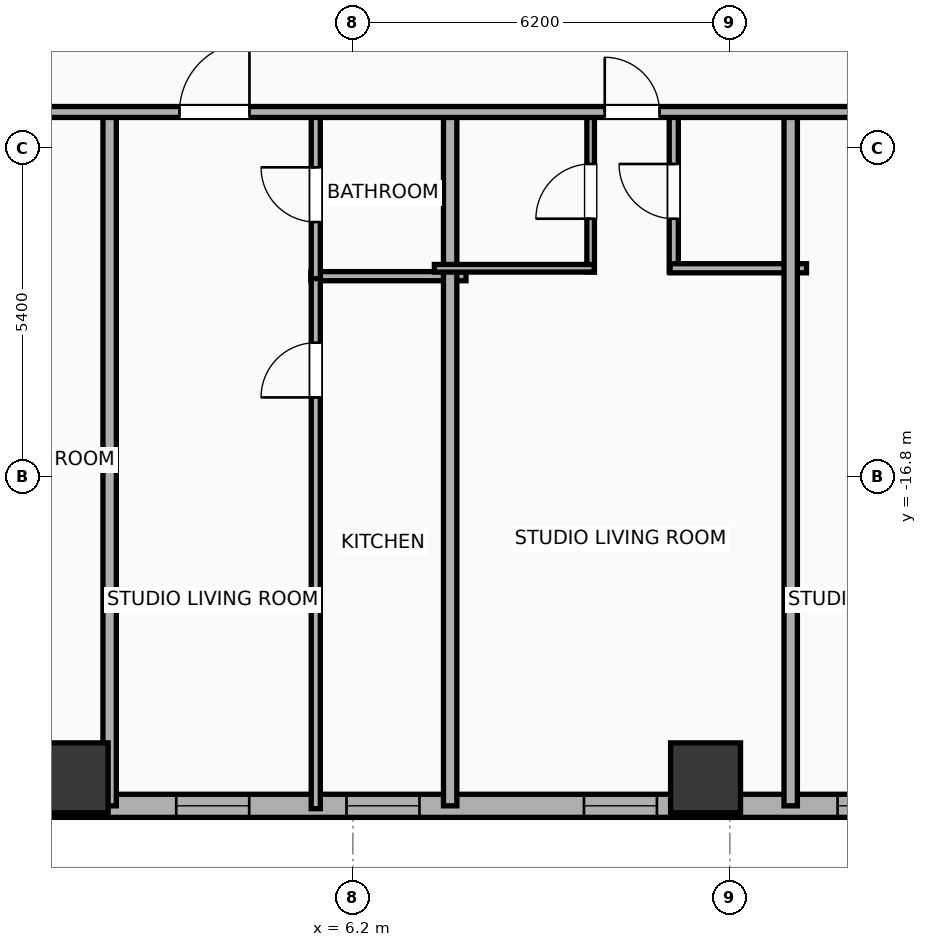
"""IFC4 building model, lengths in metres.
Left out: names, types, materials, properties, quantities, classifications, styles, units other than length and angle.
Written with IfcOpenShell. Run it as: python <this file> out.ifc"""

import sys

from ifc_helpers import new_model, si_unit, direction, frame, frame_2d, origin, origin_2d, place, context, subcontext, project, spatial, rectangle, hollow_rectangle, extrude, element, fill, save


model = new_model("IFC4")
c1 = context("Model", 3, precision=1e-05, world=origin(), true_north=direction((0.0, 1.0)))
c2 = subcontext(c1, "Body", "Model", "MODEL_VIEW")
j1 = project(units=[si_unit("LENGTHUNIT", "METRE"), si_unit("PLANEANGLEUNIT", "RADIAN")], contexts=[c1])
p1 = place(None, origin())
s1 = spatial("IfcSite", under=j1, at=p1, CompositionType="ELEMENT")
p2 = place(p1, origin())
s2 = spatial("IfcBuilding", under=s1, at=p2, CompositionType="ELEMENT")
p3 = place(p2, frame((0.0, 0.0, 29.9)))
s3 = spatial("IfcBuildingStorey", under=s2, at=p3, CompositionType="ELEMENT", Elevation=29.9)
for number, where, z_axis, x_axis in (
    (1, (1.6, -21.75, 0.0), (0.0, 0.0, 1.0), (1.0, 0.0, 0.0)),
    (2, (12.0, -21.75, 0.0), (0.0, 0.0, 1.0), (1.0, 0.0, 0.0)),
):
    element("IfcColumn", number, at=place(p3, frame(where, z_axis=z_axis, x_axis=x_axis)), inside=s3, PredefinedType="COLUMN", context=c2, shape_type="SweptSolid", body=[
        extrude(hollow_rectangle(XDim=1.15, YDim=1.15, WallThickness=0.04, at=origin_2d()), origin(), (0.0, 0.0, 1.0), 3.9),
    ])
p4 = place(p3, frame((22.381, -22.21, 0.0), z_axis=(0.0, 0.0, 1.0), x_axis=(-1.0, 0.0, 0.0)))
e3 = element("IfcWall", 3, at=p4, inside=s3, PredefinedType="ELEMENTEDWALL", context=c2, shape_type="SweptSolid", body=[
    extrude(rectangle(XDim=51.963, YDim=0.38, at=frame_2d((25.981, 0.0))), origin(), (0.0, 0.0, 1.0), 2.54),
])
p5 = place(p4, frame((5.81, 0.0, 0.75)))
e4 = element("IfcOpeningElement", 4, at=p5, cuts=e3, PredefinedType="OPENING", context=c2, shape_type="SweptSolid", body=[
    extrude(rectangle(XDim=2.4, YDim=1.63, at=frame_2d((1.2, 0.815))), frame((0.0, 0.2, 0.0), z_axis=(0.0, -1.0, 0.0), x_axis=(1.0, 0.0, 0.0)), (0.0, 0.0, 1.0), 0.4),
])
p6 = place(p4, frame((26.431, 0.0, 0.75)))
e5 = element("IfcOpeningElement", 5, at=p6, cuts=e3, PredefinedType="OPENING", context=c2, shape_type="SweptSolid", body=[
    extrude(rectangle(XDim=2.4, YDim=1.63, at=frame_2d((1.2, 0.815))), frame((0.0, 0.2, 0.0), z_axis=(0.0, -1.0, 0.0), x_axis=(1.0, 0.0, 0.0)), (0.0, 0.0, 1.0), 0.4),
])
p7 = place(p4, frame((42.952, 0.0, 0.75)))
e6 = element("IfcOpeningElement", 6, at=p7, cuts=e3, PredefinedType="OPENING", context=c2, shape_type="SweptSolid", body=[
    extrude(rectangle(XDim=2.4, YDim=1.63, at=frame_2d((1.2, 0.815))), frame((0.0, 0.2, 0.0), z_axis=(0.0, -1.0, 0.0), x_axis=(1.0, 0.0, 0.0)), (0.0, 0.0, 1.0), 0.4),
])
p8 = place(p4, frame((49.027, 0.0, 0.75)))
e7 = element("IfcOpeningElement", 7, at=p8, cuts=e3, PredefinedType="OPENING", context=c2, shape_type="SweptSolid", body=[
    extrude(rectangle(XDim=1.2, YDim=1.63, at=frame_2d((0.6, 0.815))), frame((0.0, 0.2, 0.0), z_axis=(0.0, -1.0, 0.0), x_axis=(1.0, 0.0, 0.0)), (0.0, 0.0, 1.0), 0.4),
])
p9 = place(p4, frame((46.476, 0.0, 0.75)))
e8 = element("IfcOpeningElement", 8, at=p9, cuts=e3, PredefinedType="OPENING", context=c2, shape_type="SweptSolid", body=[
    extrude(rectangle(XDim=1.2, YDim=1.63, at=frame_2d((0.6, 0.815))), frame((0.0, 0.2, 0.0), z_axis=(0.0, -1.0, 0.0), x_axis=(1.0, 0.0, 0.0)), (0.0, 0.0, 1.0), 0.4),
])
p10 = place(p4, frame((39.181, 0.0, 0.75)))
e9 = element("IfcOpeningElement", 9, at=p10, cuts=e3, PredefinedType="OPENING", context=c2, shape_type="SweptSolid", body=[
    extrude(rectangle(XDim=1.2, YDim=1.63, at=frame_2d((0.6, 0.815))), frame((0.0, 0.2, 0.0), z_axis=(0.0, -1.0, 0.0), x_axis=(1.0, 0.0, 0.0)), (0.0, 0.0, 1.0), 0.4),
])
p11 = place(p4, frame((32.476, 0.0, 0.75)))
e10 = element("IfcOpeningElement", 10, at=p11, cuts=e3, PredefinedType="OPENING", context=c2, shape_type="SweptSolid", body=[
    extrude(rectangle(XDim=1.2, YDim=1.63, at=frame_2d((0.6, 0.815))), frame((0.0, 0.2, 0.0), z_axis=(0.0, -1.0, 0.0), x_axis=(1.0, 0.0, 0.0)), (0.0, 0.0, 1.0), 0.4),
])
p12 = place(p4, frame((35.276, 0.0, 0.75)))
e11 = element("IfcOpeningElement", 11, at=p12, cuts=e3, PredefinedType="OPENING", context=c2, shape_type="SweptSolid", body=[
    extrude(rectangle(XDim=1.2, YDim=1.63, at=frame_2d((0.6, 0.815))), frame((0.0, 0.2, 0.0), z_axis=(0.0, -1.0, 0.0), x_axis=(1.0, 0.0, 0.0)), (0.0, 0.0, 1.0), 0.4),
])
p13 = place(p4, frame((29.491, 0.0, 0.75)))
e12 = element("IfcOpeningElement", 12, at=p13, cuts=e3, PredefinedType="OPENING", context=c2, shape_type="SweptSolid", body=[
    extrude(rectangle(XDim=0.85, YDim=1.63, at=frame_2d((0.425, 0.815))), frame((0.0, 0.2, 0.0), z_axis=(0.0, -1.0, 0.0), x_axis=(1.0, 0.0, 0.0)), (0.0, 0.0, 1.0), 0.4),
])
p14 = place(p4, frame((21.596, 0.0, 0.75)))
e13 = element("IfcOpeningElement", 13, at=p14, cuts=e3, PredefinedType="OPENING", context=c2, shape_type="SweptSolid", body=[
    extrude(rectangle(XDim=1.2, YDim=1.63, at=frame_2d((0.6, 0.815))), frame((0.0, 0.2, 0.0), z_axis=(0.0, -1.0, 0.0), x_axis=(1.0, 0.0, 0.0)), (0.0, 0.0, 1.0), 0.4),
])
p15 = place(p4, frame((24.036, 0.0, 0.75)))
e14 = element("IfcOpeningElement", 14, at=p15, cuts=e3, PredefinedType="OPENING", context=c2, shape_type="SweptSolid", body=[
    extrude(rectangle(XDim=1.2, YDim=1.63, at=frame_2d((0.6, 0.815))), frame((0.0, 0.2, 0.0), z_axis=(0.0, -1.0, 0.0), x_axis=(1.0, 0.0, 0.0)), (0.0, 0.0, 1.0), 0.4),
])
p16 = place(p4, frame((17.886, 0.0, 0.75)))
e15 = element("IfcOpeningElement", 15, at=p16, cuts=e3, PredefinedType="OPENING", context=c2, shape_type="SweptSolid", body=[
    extrude(rectangle(XDim=1.2, YDim=1.63, at=frame_2d((0.6, 0.815))), frame((0.0, 0.2, 0.0), z_axis=(0.0, -1.0, 0.0), x_axis=(1.0, 0.0, 0.0)), (0.0, 0.0, 1.0), 0.4),
])
p17 = place(p4, frame((15.086, 0.0, 0.75)))
e16 = element("IfcOpeningElement", 16, at=p17, cuts=e3, PredefinedType="OPENING", context=c2, shape_type="SweptSolid", body=[
    extrude(rectangle(XDim=1.2, YDim=1.63, at=frame_2d((0.6, 0.815))), frame((0.0, 0.2, 0.0), z_axis=(0.0, -1.0, 0.0), x_axis=(1.0, 0.0, 0.0)), (0.0, 0.0, 1.0), 0.4),
])
p18 = place(p4, frame((11.181, 0.0, 0.75)))
e17 = element("IfcOpeningElement", 17, at=p18, cuts=e3, PredefinedType="OPENING", context=c2, shape_type="SweptSolid", body=[
    extrude(rectangle(XDim=1.2, YDim=1.63, at=frame_2d((0.6, 0.815))), frame((0.0, 0.2, 0.0), z_axis=(0.0, -1.0, 0.0), x_axis=(1.0, 0.0, 0.0)), (0.0, 0.0, 1.0), 0.4),
])
p19 = place(p4, frame((3.886, 0.0, 0.75)))
e18 = element("IfcOpeningElement", 18, at=p19, cuts=e3, PredefinedType="OPENING", context=c2, shape_type="SweptSolid", body=[
    extrude(rectangle(XDim=1.2, YDim=1.63, at=frame_2d((0.6, 0.815))), frame((0.0, 0.2, 0.0), z_axis=(0.0, -1.0, 0.0), x_axis=(1.0, 0.0, 0.0)), (0.0, 0.0, 1.0), 0.4),
])
p20 = place(p4, frame((1.536, 0.0, 0.75)))
e19 = element("IfcOpeningElement", 19, at=p20, cuts=e3, PredefinedType="OPENING", context=c2, shape_type="SweptSolid", body=[
    extrude(rectangle(XDim=1.2, YDim=1.63, at=frame_2d((0.6, 0.815))), frame((0.0, 0.2, 0.0), z_axis=(0.0, -1.0, 0.0), x_axis=(1.0, 0.0, 0.0)), (0.0, 0.0, 1.0), 0.4),
])
p21 = place(p3, frame((2.2, -22.21, 0.0), z_axis=(0.0, 0.0, 1.0), x_axis=(0.0, 1.0, 0.0)))
e20 = element("IfcWall", 20, at=p21, inside=s3, PredefinedType="PARTITIONING", context=c2, shape_type="SweptSolid", body=[
    extrude(rectangle(XDim=11.49, YDim=0.22, at=frame_2d((5.745, 0.0))), origin(), (0.0, 0.0, 1.0), 2.54),
])
p22 = place(p3, frame((5.51, -13.5, 0.0), z_axis=(0.0, 0.0, 1.0), x_axis=(1.0, 0.0, 0.0)))
e21 = element("IfcWall", 21, at=p22, inside=s3, PredefinedType="PLUMBINGWALL", context=c2, shape_type="SweptSolid", body=[
    extrude(rectangle(XDim=2.55, YDim=0.15, at=frame_2d((1.275, 0.0))), origin(), (0.0, 0.0, 1.0), 3.65),
])
p23 = place(p3, frame((5.59, -22.258, 0.0), z_axis=(0.0, 0.0, 1.0), x_axis=(0.0, 1.0, 0.0)))
e22 = element("IfcWall", 22, at=p23, inside=s3, PredefinedType="PLUMBINGWALL", context=c2, shape_type="SweptSolid", body=[
    extrude(rectangle(XDim=8.798, YDim=0.15, at=frame_2d((4.399, 0.0))), origin(), (0.0, 0.0, 1.0), 3.65),
])
p24 = place(p23, frame((6.764, 0.0, 0.0)))
e23 = element("IfcOpeningElement", 23, at=p24, cuts=e22, PredefinedType="OPENING", context=c2, shape_type="SweptSolid", body=[
    extrude(rectangle(XDim=0.9, YDim=2.05, at=frame_2d((0.45, 1.025))), frame((0.0, 0.085, 0.0), z_axis=(0.0, -1.0, 0.0), x_axis=(1.0, 0.0, 0.0)), (0.0, 0.0, 1.0), 0.17),
])
p25 = place(p3, frame((5.59, -13.54, 0.0), z_axis=(0.0, 0.0, 1.0), x_axis=(0.0, 1.0, 0.0)))
e24 = element("IfcWall", 24, at=p25, inside=s3, PredefinedType="PLUMBINGWALL", context=c2, shape_type="SweptSolid", body=[
    extrude(rectangle(XDim=2.76, YDim=0.15, at=frame_2d((1.38, 0.0))), origin(), (0.0, 0.0, 1.0), 3.65),
])
p26 = place(p25, frame((0.93, 0.0, 0.0)))
e25 = element("IfcOpeningElement", 25, at=p26, cuts=e24, PredefinedType="OPENING", context=c2, shape_type="SweptSolid", body=[
    extrude(rectangle(XDim=0.9, YDim=2.05, at=frame_2d((0.45, 1.025))), frame((0.0, 0.085, 0.0), z_axis=(0.0, -1.0, 0.0), x_axis=(1.0, 0.0, 0.0)), (0.0, 0.0, 1.0), 0.17),
])
p27 = place(p3, frame((7.8, -22.21, 0.0), z_axis=(0.0, 0.0, 1.0), x_axis=(0.0, 1.0, 0.0)))
e26 = element("IfcWall", 26, at=p27, inside=s3, PredefinedType="PARTITIONING", context=c2, shape_type="SweptSolid", body=[
    extrude(rectangle(XDim=11.49, YDim=0.22, at=frame_2d((5.745, 0.0))), origin(), (0.0, 0.0, 1.0), 3.65),
])
p28 = place(p3, frame((10.11, -13.43, 0.0), z_axis=(0.0, 0.0, 1.0), x_axis=(0.0, 1.0, 0.0)))
e27 = element("IfcWall", 27, at=p28, inside=s3, PredefinedType="PARTITIONING", context=c2, shape_type="SweptSolid", body=[
    extrude(rectangle(XDim=2.65, YDim=0.125, at=frame_2d((1.325, 0.0))), origin(), (0.0, 0.0, 1.0), 3.65),
])
p29 = place(p28, frame((0.875, 0.0, 0.0)))
e28 = element("IfcOpeningElement", 28, at=p29, cuts=e27, PredefinedType="OPENING", context=c2, shape_type="SweptSolid", body=[
    extrude(rectangle(XDim=0.9, YDim=2.05, at=frame_2d((0.45, 1.025))), frame((0.0, 0.073, 0.0), z_axis=(0.0, -1.0, 0.0), x_axis=(1.0, 0.0, 0.0)), (0.0, 0.0, 1.0), 0.145),
])
p30 = place(p3, frame((11.477, -13.43, 0.0), z_axis=(0.0, 0.0, 1.0), x_axis=(0.0, 1.0, 0.0)))
e29 = element("IfcWall", 29, at=p30, inside=s3, PredefinedType="PLUMBINGWALL", context=c2, shape_type="SweptSolid", body=[
    extrude(rectangle(XDim=2.65, YDim=0.15, at=frame_2d((1.325, 0.0))), origin(), (0.0, 0.0, 1.0), 3.65),
])
p31 = place(p30, frame((0.875, 0.0, 0.0)))
e30 = element("IfcOpeningElement", 30, at=p31, cuts=e29, PredefinedType="OPENING", context=c2, shape_type="SweptSolid", body=[
    extrude(rectangle(XDim=0.9, YDim=2.05, at=frame_2d((0.45, 1.025))), frame((0.0, 0.085, 0.0), z_axis=(0.0, -1.0, 0.0), x_axis=(1.0, 0.0, 0.0)), (0.0, 0.0, 1.0), 0.17),
])
p32 = place(p3, frame((7.54, -13.37, 0.0), z_axis=(0.0, 0.0, 1.0), x_axis=(1.0, 0.0, 0.0)))
e31 = element("IfcWall", 31, at=p32, inside=s3, PredefinedType="PARTITIONING", context=c2, shape_type="SweptSolid", body=[
    extrude(rectangle(XDim=2.63, YDim=0.125, at=frame_2d((1.315, 0.0))), origin(), (0.0, 0.0, 1.0), 3.65),
])
p33 = place(p3, frame((11.417, -13.37, 0.0), z_axis=(0.0, 0.0, 1.0), x_axis=(1.0, 0.0, 0.0)))
e32 = element("IfcWall", 32, at=p33, inside=s3, PredefinedType="PLUMBINGWALL", context=c2, shape_type="SweptSolid", body=[
    extrude(rectangle(XDim=2.243, YDim=0.15, at=frame_2d((1.122, 0.0))), origin(), (0.0, 0.0, 1.0), 3.65),
])
p34 = place(p3, frame((13.4, -22.21, 0.0), z_axis=(0.0, 0.0, 1.0), x_axis=(0.0, 1.0, 0.0)))
e33 = element("IfcWall", 33, at=p34, inside=s3, PredefinedType="PARTITIONING", context=c2, shape_type="SweptSolid", body=[
    extrude(rectangle(XDim=11.49, YDim=0.22, at=frame_2d((5.745, 0.0))), origin(), (0.0, 0.0, 1.0), 3.65),
])
p35 = place(p3, frame((-33.41, -10.8, 0.0), z_axis=(0.0, 0.0, 1.0), x_axis=(1.0, 0.0, 0.0)))
e34 = element("IfcWall", 34, at=p35, inside=s3, PredefinedType="PARTITIONING", context=c2, shape_type="SweptSolid", body=[
    extrude(rectangle(XDim=59.62, YDim=0.18, at=frame_2d((29.81, 0.0))), origin(), (0.0, 0.0, 1.0), 3.65),
])
p36 = place(p35, frame((3.36, 0.0, 0.0)))
e35 = element("IfcOpeningElement", 35, at=p36, cuts=e34, PredefinedType="OPENING", context=c2, shape_type="SweptSolid", body=[
    extrude(rectangle(XDim=1.15, YDim=2.05, at=frame_2d((0.575, 1.025))), frame((0.0, 0.1, 0.0), z_axis=(0.0, -1.0, 0.0), x_axis=(1.0, 0.0, 0.0)), (0.0, 0.0, 1.0), 0.2),
])
p37 = place(p35, frame((10.908, 0.0, 0.0)))
e36 = element("IfcOpeningElement", 36, at=p37, cuts=e34, PredefinedType="OPENING", context=c2, shape_type="SweptSolid", body=[
    extrude(rectangle(XDim=1.15, YDim=2.05, at=frame_2d((0.575, 1.025))), frame((0.0, 0.1, 0.0), z_axis=(0.0, -1.0, 0.0), x_axis=(1.0, 0.0, 0.0)), (0.0, 0.0, 1.0), 0.2),
])
p38 = place(p35, frame((15.755, 0.0, 0.0)))
e37 = element("IfcOpeningElement", 37, at=p38, cuts=e34, PredefinedType="OPENING", context=c2, shape_type="SweptSolid", body=[
    extrude(rectangle(XDim=0.9, YDim=2.05, at=frame_2d((0.45, 1.025))), frame((0.0, 0.1, 0.0), z_axis=(0.0, -1.0, 0.0), x_axis=(1.0, 0.0, 0.0)), (0.0, 0.0, 1.0), 0.2),
])
p39 = place(p35, frame((22.11, 0.0, 0.0)))
e38 = element("IfcOpeningElement", 38, at=p39, cuts=e34, PredefinedType="OPENING", context=c2, shape_type="SweptSolid", body=[
    extrude(rectangle(XDim=1.15, YDim=2.05, at=frame_2d((0.575, 1.025))), frame((0.0, 0.1, 0.0), z_axis=(0.0, -1.0, 0.0), x_axis=(1.0, 0.0, 0.0)), (0.0, 0.0, 1.0), 0.2),
])
p40 = place(p35, frame((27.709, 0.0, 0.0)))
e39 = element("IfcOpeningElement", 39, at=p40, cuts=e34, PredefinedType="OPENING", context=c2, shape_type="SweptSolid", body=[
    extrude(rectangle(XDim=1.15, YDim=2.05, at=frame_2d((0.575, 1.025))), frame((0.0, 0.1, 0.0), z_axis=(0.0, -1.0, 0.0), x_axis=(1.0, 0.0, 0.0)), (0.0, 0.0, 1.0), 0.2),
])
p41 = place(p35, frame((33.349, 0.0, 0.0)))
e40 = element("IfcOpeningElement", 40, at=p41, cuts=e34, PredefinedType="OPENING", context=c2, shape_type="SweptSolid", body=[
    extrude(rectangle(XDim=1.15, YDim=2.05, at=frame_2d((0.575, 1.025))), frame((0.0, 0.1, 0.0), z_axis=(0.0, -1.0, 0.0), x_axis=(1.0, 0.0, 0.0)), (0.0, 0.0, 1.0), 0.2),
])
p42 = place(p35, frame((36.759, 0.0, 0.0)))
e41 = element("IfcOpeningElement", 41, at=p42, cuts=e34, PredefinedType="OPENING", context=c2, shape_type="SweptSolid", body=[
    extrude(rectangle(XDim=1.15, YDim=2.05, at=frame_2d((0.575, 1.025))), frame((0.0, 0.1, 0.0), z_axis=(0.0, -1.0, 0.0), x_axis=(1.0, 0.0, 0.0)), (0.0, 0.0, 1.0), 0.2),
])
p43 = place(p35, frame((43.752, 0.0, 0.0)))
e42 = element("IfcOpeningElement", 42, at=p43, cuts=e34, PredefinedType="OPENING", context=c2, shape_type="SweptSolid", body=[
    extrude(rectangle(XDim=0.9, YDim=2.05, at=frame_2d((0.45, 1.025))), frame((0.0, 0.1, 0.0), z_axis=(0.0, -1.0, 0.0), x_axis=(1.0, 0.0, 0.0)), (0.0, 0.0, 1.0), 0.2),
])
p44 = place(p35, frame((47.962, 0.0, 0.0)))
e43 = element("IfcOpeningElement", 43, at=p44, cuts=e34, PredefinedType="OPENING", context=c2, shape_type="SweptSolid", body=[
    extrude(rectangle(XDim=1.15, YDim=2.05, at=frame_2d((0.575, 1.025))), frame((0.0, 0.1, 0.0), z_axis=(0.0, -1.0, 0.0), x_axis=(1.0, 0.0, 0.0)), (0.0, 0.0, 1.0), 0.2),
])
p45 = place(p35, frame((55.641, 0.0, 0.0)))
e44 = element("IfcOpeningElement", 44, at=p45, cuts=e34, PredefinedType="OPENING", context=c2, shape_type="SweptSolid", body=[
    extrude(rectangle(XDim=1.15, YDim=2.05, at=frame_2d((0.575, 1.025))), frame((0.0, 0.1, 0.0), z_axis=(0.0, -1.0, 0.0), x_axis=(1.0, 0.0, 0.0)), (0.0, 0.0, 1.0), 0.2),
])
p46 = place(p5, origin())
e45 = element("IfcWindow", 45, at=p46, inside=s3, PartitioningType="SINGLE_PANEL", PredefinedType="WINDOW", context=c2, shape_type="SweptSolid", body=[
    extrude(rectangle(XDim=2.4, YDim=1.63, at=frame_2d((1.2, 0.815))), frame((0.0, 0.03, 0.0), z_axis=(0.0, -1.0, 0.0), x_axis=(1.0, 0.0, 0.0)), (0.0, 0.0, 1.0), 0.06),
])
fill(e4, e45)
p47 = place(p16, origin())
e46 = element("IfcWindow", 46, at=p47, inside=s3, PartitioningType="SINGLE_PANEL", PredefinedType="WINDOW", context=c2, shape_type="SweptSolid", body=[
    extrude(rectangle(XDim=1.2, YDim=1.63, at=frame_2d((0.6, 0.815))), frame((0.0, 0.03, 0.0), z_axis=(0.0, -1.0, 0.0), x_axis=(1.0, 0.0, 0.0)), (0.0, 0.0, 1.0), 0.06),
])
fill(e15, e46)
p48 = place(p17, origin())
e47 = element("IfcWindow", 47, at=p48, inside=s3, PartitioningType="SINGLE_PANEL", PredefinedType="WINDOW", context=c2, shape_type="SweptSolid", body=[
    extrude(rectangle(XDim=1.2, YDim=1.63, at=frame_2d((0.6, 0.815))), frame((0.0, 0.03, 0.0), z_axis=(0.0, -1.0, 0.0), x_axis=(1.0, 0.0, 0.0)), (0.0, 0.0, 1.0), 0.06),
])
fill(e16, e47)
p49 = place(p18, origin())
e48 = element("IfcWindow", 48, at=p49, inside=s3, PartitioningType="SINGLE_PANEL", PredefinedType="WINDOW", context=c2, shape_type="SweptSolid", body=[
    extrude(rectangle(XDim=1.2, YDim=1.63, at=frame_2d((0.6, 0.815))), frame((0.0, 0.03, 0.0), z_axis=(0.0, -1.0, 0.0), x_axis=(1.0, 0.0, 0.0)), (0.0, 0.0, 1.0), 0.06),
])
fill(e17, e48)
p50 = place(p24, origin())
e49 = element("IfcDoor", 49, at=p50, inside=s3, OperationType="SINGLE_SWING_LEFT", PredefinedType="DOOR", context=c2, shape_type="SweptSolid", body=[
    extrude(rectangle(XDim=0.9, YDim=2.05, at=frame_2d((0.45, 1.025))), frame((0.0, 0.025, 0.0), z_axis=(0.0, -1.0, 0.0), x_axis=(1.0, 0.0, 0.0)), (0.0, 0.0, 1.0), 0.05),
])
fill(e23, e49)
p51 = place(p26, origin())
e50 = element("IfcDoor", 50, at=p51, inside=s3, OperationType="SINGLE_SWING_RIGHT", PredefinedType="DOOR", context=c2, shape_type="SweptSolid", body=[
    extrude(rectangle(XDim=0.9, YDim=2.05, at=frame_2d((0.45, 1.025))), frame((0.0, 0.025, 0.0), z_axis=(0.0, -1.0, 0.0), x_axis=(1.0, 0.0, 0.0)), (0.0, 0.0, 1.0), 0.05),
])
fill(e25, e50)
p52 = place(p29, origin())
e51 = element("IfcDoor", 51, at=p52, inside=s3, OperationType="SINGLE_SWING_LEFT", PredefinedType="DOOR", context=c2, shape_type="SweptSolid", body=[
    extrude(rectangle(XDim=0.9, YDim=2.05, at=frame_2d((0.45, 1.025))), frame((0.0, 0.025, 0.0), z_axis=(0.0, -1.0, 0.0), x_axis=(1.0, 0.0, 0.0)), (0.0, 0.0, 1.0), 0.05),
])
fill(e28, e51)
p53 = place(p31, origin())
e52 = element("IfcDoor", 52, at=p53, inside=s3, OperationType="SINGLE_SWING_RIGHT", PredefinedType="DOOR", context=c2, shape_type="SweptSolid", body=[
    extrude(rectangle(XDim=0.9, YDim=2.05, at=frame_2d((0.45, 1.025))), frame((0.0, 0.025, 0.0), z_axis=(0.0, -1.0, 0.0), x_axis=(1.0, 0.0, 0.0)), (0.0, 0.0, 1.0), 0.05),
])
fill(e30, e52)
p54 = place(p42, origin())
e53 = element("IfcDoor", 53, at=p54, inside=s3, OperationType="SINGLE_SWING_RIGHT", PredefinedType="DOOR", context=c2, shape_type="SweptSolid", body=[
    extrude(rectangle(XDim=1.15, YDim=2.05, at=frame_2d((0.575, 1.025))), frame((0.0, 0.025, 0.0), z_axis=(0.0, -1.0, 0.0), x_axis=(1.0, 0.0, 0.0)), (0.0, 0.0, 1.0), 0.05),
])
fill(e41, e53)
p55 = place(p43, origin())
e54 = element("IfcDoor", 54, at=p55, inside=s3, OperationType="SINGLE_SWING_LEFT", PredefinedType="DOOR", context=c2, shape_type="SweptSolid", body=[
    extrude(rectangle(XDim=0.9, YDim=2.05, at=frame_2d((0.45, 1.025))), frame((0.0, 0.025, 0.0), z_axis=(0.0, -1.0, 0.0), x_axis=(1.0, 0.0, 0.0)), (0.0, 0.0, 1.0), 0.05),
])
fill(e42, e54)
save(model, sys.argv[1])
